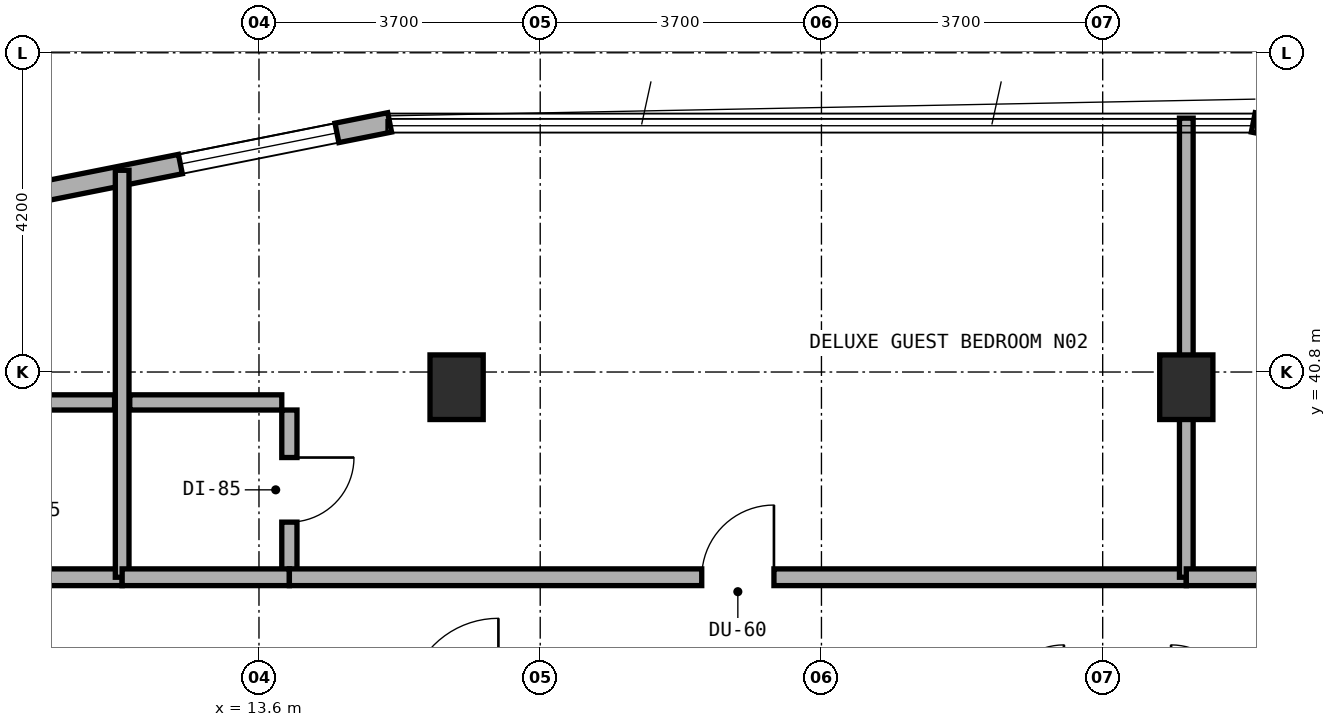
"""IFC4 building model, lengths in metres.
Left out: names, types, materials, properties, quantities, classifications, styles, units other than length and angle.
Written with IfcOpenShell. Run it as: python <this file> out.ifc"""

import sys

from ifc_helpers import new_model, si_unit, direction, frame, frame_2d, origin, origin_2d, place, context, subcontext, project, spatial, rectangle, extrude, element, fill, save


model = new_model("IFC4")
c1 = context("Model", 3, precision=1e-05, world=origin(), true_north=direction((0.0, 1.0)))
c2 = subcontext(c1, "Body", "Model", "MODEL_VIEW")
j1 = project(units=[si_unit("LENGTHUNIT", "METRE"), si_unit("PLANEANGLEUNIT", "RADIAN")], contexts=[c1])
p1 = place(None, origin())
s1 = spatial("IfcSite", under=j1, at=p1, CompositionType="ELEMENT")
p2 = place(p1, origin())
s2 = spatial("IfcBuilding", under=s1, at=p2, CompositionType="ELEMENT")
p3 = place(p2, frame((0.0, 0.0, 235.1)))
s3 = spatial("IfcBuildingStorey", under=s2, at=p3, CompositionType="ELEMENT", Elevation=235.1)
for number, where, z_axis, x_axis in (
    (1, (16.2, 40.6, 0.0), (0.0, 0.0, 1.0), (1.0, 0.0, 0.0)),
    (2, (25.8, 40.6, 0.0), (0.0, 0.0, 1.0), (1.0, 0.0, 0.0)),
):
    element("IfcColumn", number, at=place(p3, frame(where, z_axis=z_axis, x_axis=x_axis)), inside=s3, PredefinedType="COLUMN", context=c2, shape_type="SweptSolid", body=[
        extrude(rectangle(XDim=0.7, YDim=0.85, at=origin_2d()), origin(), (0.0, 0.0, 1.0), 3.6),
    ])
p4 = place(p3, frame((35.283, 42.371, 0.0), z_axis=(0.0, 0.0, 1.0), x_axis=(-0.980745199176, 0.195291715883, 0.0)))
e3 = element("IfcWall", 3, at=p4, inside=s3, PredefinedType="STANDARD", context=c2, shape_type="SweptSolid", body=[
    extrude(rectangle(XDim=8.771, YDim=0.26, at=frame_2d((4.385, 0.0))), origin(), (0.0, 0.0, 1.0), 3.28),
])
p5 = place(p4, frame((3.925, 0.0, 0.85)))
e4 = element("IfcOpeningElement", 4, at=p5, cuts=e3, PredefinedType="OPENING", context=c2, shape_type="SweptSolid", body=[
    extrude(rectangle(XDim=2.1, YDim=1.5, at=frame_2d((1.05, 0.75))), frame((0.0, 0.14, 0.0), z_axis=(0.0, -1.0, 0.0), x_axis=(1.0, 0.0, 0.0)), (0.0, 0.0, 1.0), 0.28),
])
p6 = place(p3, frame((15.319, 44.084, 0.0), z_axis=(0.0, 0.0, 1.0), x_axis=(-0.980745199176, -0.195291715883, 0.0)))
e5 = element("IfcWall", 5, at=p6, inside=s3, PredefinedType="STANDARD", context=c2, shape_type="SweptSolid", body=[
    extrude(rectangle(XDim=8.771, YDim=0.26, at=frame_2d((4.385, 0.0))), origin(), (0.0, 0.0, 1.0), 3.28),
])
p7 = place(p6, frame((0.707, 0.0, 0.85)))
e6 = element("IfcOpeningElement", 6, at=p7, cuts=e5, PredefinedType="OPENING", context=c2, shape_type="SweptSolid", body=[
    extrude(rectangle(XDim=2.1, YDim=1.5, at=frame_2d((1.05, 0.75))), frame((0.0, 0.14, 0.0), z_axis=(0.0, -1.0, 0.0), x_axis=(1.0, 0.0, 0.0)), (0.0, 0.0, 1.0), 0.28),
])
p8 = place(p6, frame((5.191, 0.0, 0.85)))
e7 = element("IfcOpeningElement", 7, at=p8, cuts=e5, PredefinedType="OPENING", context=c2, shape_type="SweptSolid", body=[
    extrude(rectangle(XDim=2.1, YDim=1.5, at=frame_2d((1.05, 0.75))), frame((0.0, 0.14, 0.0), z_axis=(0.0, -1.0, 0.0), x_axis=(1.0, 0.0, 0.0)), (0.0, 0.0, 1.0), 0.28),
])
p9 = place(p3, frame((9.7, 40.4, 0.0), z_axis=(0.0, 0.0, 1.0), x_axis=(1.0, 0.0, 0.0)))
e8 = element("IfcWall", 8, at=p9, inside=s3, PredefinedType="PLUMBINGWALL", context=c2, shape_type="SweptSolid", body=[
    extrude(rectangle(XDim=2.0, YDim=0.2, at=frame_2d((1.0, 0.0))), origin(), (0.0, 0.0, 1.0), 2.975),
])
p10 = place(p3, frame((9.6, 38.1, 0.0), z_axis=(0.0, 0.0, 1.0), x_axis=(1.0, 0.0, 0.0)))
e9 = element("IfcWall", 9, at=p10, inside=s3, PredefinedType="SOLIDWALL", context=c2, shape_type="SweptSolid", body=[
    extrude(rectangle(XDim=2.2, YDim=0.22, at=frame_2d((1.1, 0.0))), origin(), (0.0, 0.0, 1.0), 3.28),
])
p11 = place(p3, frame((11.8, 38.1, 0.0), z_axis=(0.0, 0.0, 1.0), x_axis=(0.0, 1.0, 0.0)))
e10 = element("IfcWall", 10, at=p11, inside=s3, PredefinedType="SOLIDWALL", context=c2, shape_type="SweptSolid", body=[
    extrude(rectangle(XDim=5.354, YDim=0.18, at=frame_2d((2.677, 0.0))), origin(), (0.0, 0.0, 1.0), 2.895),
])
p12 = place(p3, frame((14.0, 38.2, 0.0), z_axis=(0.0, 0.0, 1.0), x_axis=(0.0, 1.0, 0.0)))
e11 = element("IfcWall", 11, at=p12, inside=s3, PredefinedType="PLUMBINGWALL", context=c2, shape_type="SweptSolid", body=[
    extrude(rectangle(XDim=2.1, YDim=0.2, at=frame_2d((1.05, 0.0))), origin(), (0.0, 0.0, 1.0), 2.895),
])
p13 = place(p12, frame((0.625, 0.0, 0.0)))
e12 = element("IfcOpeningElement", 12, at=p13, cuts=e11, PredefinedType="OPENING", context=c2, shape_type="SweptSolid", body=[
    extrude(rectangle(XDim=0.85, YDim=2.1, at=frame_2d((0.425, 1.05))), frame((0.0, 0.11, 0.0), z_axis=(0.0, -1.0, 0.0), x_axis=(1.0, 0.0, 0.0)), (0.0, 0.0, 1.0), 0.22),
])
p14 = place(p3, frame((11.9, 40.4, 0.0), z_axis=(0.0, 0.0, 1.0), x_axis=(1.0, 0.0, 0.0)))
e13 = element("IfcWall", 13, at=p14, inside=s3, PredefinedType="PLUMBINGWALL", context=c2, shape_type="SweptSolid", body=[
    extrude(rectangle(XDim=2.0, YDim=0.2, at=frame_2d((1.0, 0.0))), origin(), (0.0, 0.0, 1.0), 2.975),
])
p15 = place(p3, frame((11.8, 38.1, 0.0), z_axis=(0.0, 0.0, 1.0), x_axis=(1.0, 0.0, 0.0)))
e14 = element("IfcWall", 14, at=p15, inside=s3, PredefinedType="SOLIDWALL", context=c2, shape_type="SweptSolid", body=[
    extrude(rectangle(XDim=2.2, YDim=0.22, at=frame_2d((1.1, 0.0))), origin(), (0.0, 0.0, 1.0), 3.28),
])
p16 = place(p3, frame((14.0, 38.1, 0.0), z_axis=(0.0, 0.0, 1.0), x_axis=(1.0, 0.0, 0.0)))
e15 = element("IfcWall", 15, at=p16, inside=s3, PredefinedType="SOLIDWALL", context=c2, shape_type="SweptSolid", body=[
    extrude(rectangle(XDim=11.8, YDim=0.22, at=frame_2d((5.9, 0.0))), origin(), (0.0, 0.0, 1.0), 2.705),
])
p17 = place(p16, frame((5.425, 0.0, 0.0)))
e16 = element("IfcOpeningElement", 16, at=p17, cuts=e15, PredefinedType="OPENING", context=c2, shape_type="SweptSolid", body=[
    extrude(rectangle(XDim=0.95, YDim=2.1, at=frame_2d((0.475, 1.05))), frame((0.0, 0.12, 0.0), z_axis=(0.0, -1.0, 0.0), x_axis=(1.0, 0.0, 0.0)), (0.0, 0.0, 1.0), 0.24),
])
p18 = place(p3, frame((25.8, 38.1, 0.0), z_axis=(0.0, 0.0, 1.0), x_axis=(0.0, 1.0, 0.0)))
e17 = element("IfcWall", 17, at=p18, inside=s3, PredefinedType="SOLIDWALL", context=c2, shape_type="SweptSolid", body=[
    extrude(rectangle(XDim=6.04, YDim=0.18, at=frame_2d((3.02, 0.0))), origin(), (0.0, 0.0, 1.0), 2.705),
])
p19 = place(p3, frame((25.8, 38.1, 0.0), z_axis=(0.0, 0.0, 1.0), x_axis=(1.0, 0.0, 0.0)))
e18 = element("IfcWall", 18, at=p19, inside=s3, PredefinedType="SOLIDWALL", context=c2, shape_type="SweptSolid", body=[
    extrude(rectangle(XDim=5.05, YDim=0.22, at=frame_2d((2.525, 0.0))), origin(), (0.0, 0.0, 1.0), 2.705),
])
p20 = place(p19, frame((2.05, 0.0, 0.0)))
e19 = element("IfcOpeningElement", 19, at=p20, cuts=e18, PredefinedType="OPENING", context=c2, shape_type="SweptSolid", body=[
    extrude(rectangle(XDim=0.95, YDim=2.1, at=frame_2d((0.475, 1.05))), frame((0.0, 0.12, 0.0), z_axis=(0.0, -1.0, 0.0), x_axis=(1.0, 0.0, 0.0)), (0.0, 0.0, 1.0), 0.24),
])
p21 = place(p7, origin())
e20 = element("IfcWindow", 20, at=p21, inside=s3, PartitioningType="SINGLE_PANEL", PredefinedType="WINDOW", context=c2, shape_type="SweptSolid", body=[
    extrude(rectangle(XDim=2.1, YDim=1.5, at=frame_2d((1.05, 0.75))), frame((0.0, 0.03, 0.0), z_axis=(0.0, -1.0, 0.0), x_axis=(1.0, 0.0, 0.0)), (0.0, 0.0, 1.0), 0.06),
])
fill(e6, e20)
p22 = place(p13, frame((0.85, 0.0, 0.0), z_axis=(0.0, 0.0, 1.0), x_axis=(-1.0, 0.0, 0.0)))
e21 = element("IfcDoor", 21, at=p22, inside=s3, OperationType="SINGLE_SWING_LEFT", PredefinedType="DOOR", context=c2, shape_type="SweptSolid", body=[
    extrude(rectangle(XDim=0.85, YDim=2.1, at=frame_2d((0.425, 1.05))), frame((0.0, 0.025, 0.0), z_axis=(0.0, -1.0, 0.0), x_axis=(1.0, 0.0, 0.0)), (0.0, 0.0, 1.0), 0.05),
])
fill(e12, e21)
p23 = place(p17, origin())
e22 = element("IfcDoor", 22, at=p23, inside=s3, OperationType="SINGLE_SWING_RIGHT", PredefinedType="DOOR", context=c2, shape_type="SweptSolid", body=[
    extrude(rectangle(XDim=0.95, YDim=2.1, at=frame_2d((0.475, 1.05))), frame((0.0, 0.025, 0.0), z_axis=(0.0, -1.0, 0.0), x_axis=(1.0, 0.0, 0.0)), (0.0, 0.0, 1.0), 0.05),
])
fill(e16, e22)
save(model, sys.argv[1])
